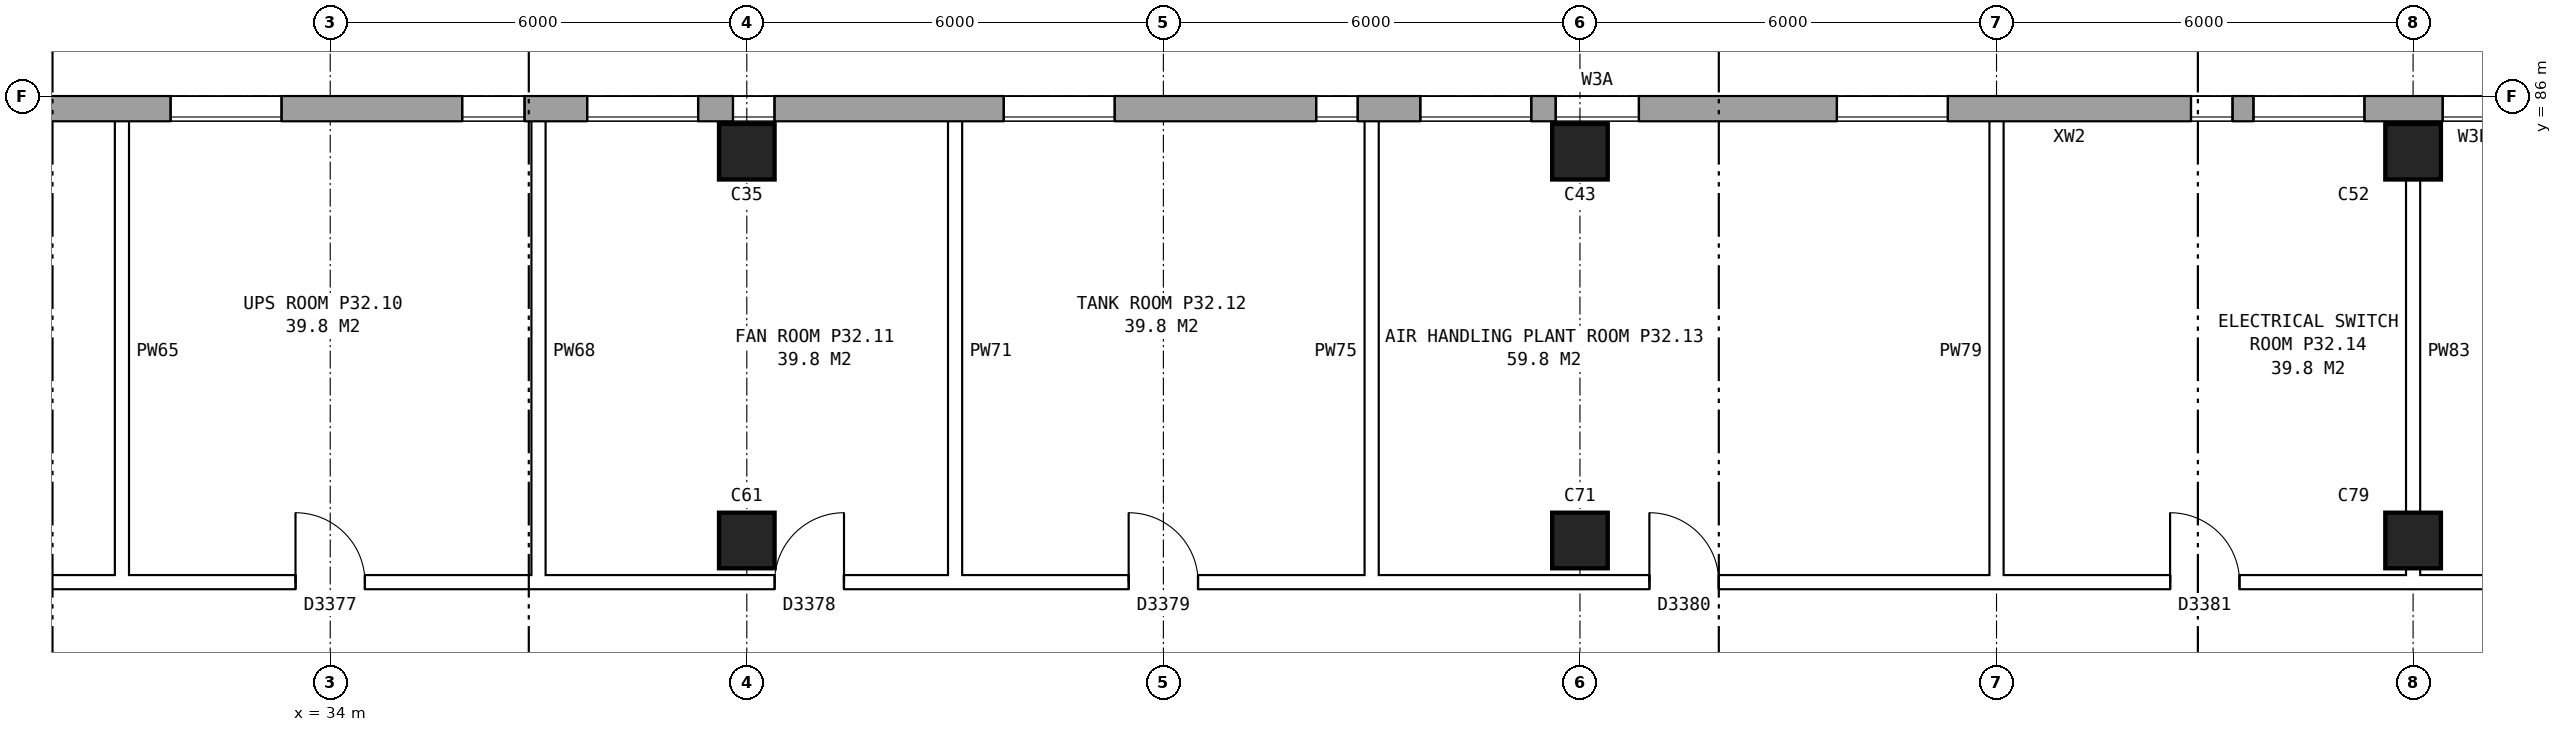
"""IFC4 building model, lengths in metres.
Left out: names, types, materials, properties, quantities, classifications, styles, units other than length and angle.
Written with IfcOpenShell. Run it as: python <this file> out.ifc"""

import sys

from ifc_helpers import new_model, si_unit, direction, frame, frame_2d, origin, origin_2d, place, context, subcontext, project, spatial, rectangle, extrude, element, fill, save


model = new_model("IFC4")
c1 = context("Model", 3, precision=1e-05, world=origin(), true_north=direction((0.0, 1.0)))
c2 = subcontext(c1, "Body", "Model", "MODEL_VIEW")
j1 = project(units=[si_unit("LENGTHUNIT", "METRE"), si_unit("PLANEANGLEUNIT", "RADIAN")], contexts=[c1])
p1 = place(None, origin())
s1 = spatial("IfcSite", under=j1, at=p1, CompositionType="ELEMENT")
p2 = place(p1, origin())
s2 = spatial("IfcBuilding", under=s1, at=p2, CompositionType="ELEMENT")
p3 = place(p2, frame((0.0, 0.0, 115.0)))
s3 = spatial("IfcBuildingStorey", under=s2, at=p3, CompositionType="ELEMENT", Elevation=115.0)
for number, where, z_axis, x_axis in (
    (1, (40.0, 79.6, 0.0), (0.0, 0.0, 1.0), (1.0, 0.0, 0.0)),
    (2, (40.0, 85.2, 0.0), (0.0, 0.0, 1.0), (1.0, 0.0, 0.0)),
    (3, (52.0, 79.6, 0.0), (0.0, 0.0, 1.0), (1.0, 0.0, 0.0)),
    (4, (52.0, 85.2, 0.0), (0.0, 0.0, 1.0), (1.0, 0.0, 0.0)),
    (5, (64.0, 79.6, 0.0), (0.0, 0.0, 1.0), (1.0, 0.0, 0.0)),
    (6, (64.0, 85.2, 0.0), (0.0, 0.0, 1.0), (1.0, 0.0, 0.0)),
):
    element("IfcColumn", number, at=place(p3, frame(where, z_axis=z_axis, x_axis=x_axis)), inside=s3, PredefinedType="COLUMN", context=c2, shape_type="SweptSolid", body=[
        extrude(rectangle(XDim=0.8, YDim=0.8, at=origin_2d()), origin(), (0.0, 0.0, 1.0), 4.2),
    ])
p4 = place(p3, frame((72.925, 85.82, 0.0), z_axis=(0.0, 0.0, 1.0), x_axis=(-1.0, 0.0, 0.0)))
e7 = element("IfcWall", 7, at=p4, inside=s3, PredefinedType="STANDARD", context=c2, shape_type="SweptSolid", body=[
    extrude(rectangle(XDim=43.101, YDim=0.36, at=frame_2d((21.55, 0.0))), origin(), (0.0, 0.0, 1.0), 4.2),
])
p5 = place(p4, frame((2.6, 0.0, 1.5)))
e8 = element("IfcOpeningElement", 8, at=p5, cuts=e7, PredefinedType="OPENING", context=c2, shape_type="SweptSolid", body=[
    extrude(rectangle(XDim=0.6, YDim=1.2, at=frame_2d((0.3, 0.6))), frame((0.0, 0.19, 0.0), z_axis=(0.0, -1.0, 0.0), x_axis=(1.0, 0.0, 0.0)), (0.0, 0.0, 1.0), 0.38),
])
p6 = place(p4, frame((3.625, 0.0, 1.5)))
e9 = element("IfcOpeningElement", 9, at=p6, cuts=e7, PredefinedType="OPENING", context=c2, shape_type="SweptSolid", body=[
    extrude(rectangle(XDim=1.6, YDim=1.2, at=frame_2d((0.8, 0.6))), frame((0.0, 0.19, 0.0), z_axis=(0.0, -1.0, 0.0), x_axis=(1.0, 0.0, 0.0)), (0.0, 0.0, 1.0), 0.38),
])
p7 = place(p4, frame((7.6, 0.0, 1.5)))
e10 = element("IfcOpeningElement", 10, at=p7, cuts=e7, PredefinedType="OPENING", context=c2, shape_type="SweptSolid", body=[
    extrude(rectangle(XDim=0.9, YDim=1.2, at=frame_2d((0.45, 0.6))), frame((0.0, 0.19, 0.0), z_axis=(0.0, -1.0, 0.0), x_axis=(1.0, 0.0, 0.0)), (0.0, 0.0, 1.0), 0.38),
])
p8 = place(p4, frame((9.625, 0.0, 1.5)))
e11 = element("IfcOpeningElement", 11, at=p8, cuts=e7, PredefinedType="OPENING", context=c2, shape_type="SweptSolid", body=[
    extrude(rectangle(XDim=1.6, YDim=1.2, at=frame_2d((0.8, 0.6))), frame((0.0, 0.19, 0.0), z_axis=(0.0, -1.0, 0.0), x_axis=(1.0, 0.0, 0.0)), (0.0, 0.0, 1.0), 0.38),
])
p9 = place(p4, frame((11.525, 0.0, 1.5)))
e12 = element("IfcOpeningElement", 12, at=p9, cuts=e7, PredefinedType="OPENING", context=c2, shape_type="SweptSolid", body=[
    extrude(rectangle(XDim=0.6, YDim=1.2, at=frame_2d((0.3, 0.6))), frame((0.0, 0.19, 0.0), z_axis=(0.0, -1.0, 0.0), x_axis=(1.0, 0.0, 0.0)), (0.0, 0.0, 1.0), 0.38),
])
p10 = place(p4, frame((15.625, 0.0, 1.5)))
e13 = element("IfcOpeningElement", 13, at=p10, cuts=e7, PredefinedType="OPENING", context=c2, shape_type="SweptSolid", body=[
    extrude(rectangle(XDim=1.6, YDim=1.2, at=frame_2d((0.8, 0.6))), frame((0.0, 0.19, 0.0), z_axis=(0.0, -1.0, 0.0), x_axis=(1.0, 0.0, 0.0)), (0.0, 0.0, 1.0), 0.38),
])
p11 = place(p4, frame((20.075, 0.0, 1.5)))
e14 = element("IfcOpeningElement", 14, at=p11, cuts=e7, PredefinedType="OPENING", context=c2, shape_type="SweptSolid", body=[
    extrude(rectangle(XDim=1.2, YDim=1.2, at=frame_2d((0.6, 0.6))), frame((0.0, 0.19, 0.0), z_axis=(0.0, -1.0, 0.0), x_axis=(1.0, 0.0, 0.0)), (0.0, 0.0, 1.0), 0.38),
])
p12 = place(p4, frame((21.625, 0.0, 1.5)))
e15 = element("IfcOpeningElement", 15, at=p12, cuts=e7, PredefinedType="OPENING", context=c2, shape_type="SweptSolid", body=[
    extrude(rectangle(XDim=1.6, YDim=1.2, at=frame_2d((0.8, 0.6))), frame((0.0, 0.19, 0.0), z_axis=(0.0, -1.0, 0.0), x_axis=(1.0, 0.0, 0.0)), (0.0, 0.0, 1.0), 0.38),
])
p13 = place(p4, frame((24.125, 0.0, 1.5)))
e16 = element("IfcOpeningElement", 16, at=p13, cuts=e7, PredefinedType="OPENING", context=c2, shape_type="SweptSolid", body=[
    extrude(rectangle(XDim=0.6, YDim=1.2, at=frame_2d((0.3, 0.6))), frame((0.0, 0.19, 0.0), z_axis=(0.0, -1.0, 0.0), x_axis=(1.0, 0.0, 0.0)), (0.0, 0.0, 1.0), 0.38),
])
p14 = place(p4, frame((27.625, 0.0, 1.5)))
e17 = element("IfcOpeningElement", 17, at=p14, cuts=e7, PredefinedType="OPENING", context=c2, shape_type="SweptSolid", body=[
    extrude(rectangle(XDim=1.6, YDim=1.2, at=frame_2d((0.8, 0.6))), frame((0.0, 0.19, 0.0), z_axis=(0.0, -1.0, 0.0), x_axis=(1.0, 0.0, 0.0)), (0.0, 0.0, 1.0), 0.38),
])
p15 = place(p4, frame((32.525, 0.0, 1.5)))
e18 = element("IfcOpeningElement", 18, at=p15, cuts=e7, PredefinedType="OPENING", context=c2, shape_type="SweptSolid", body=[
    extrude(rectangle(XDim=0.6, YDim=1.2, at=frame_2d((0.3, 0.6))), frame((0.0, 0.19, 0.0), z_axis=(0.0, -1.0, 0.0), x_axis=(1.0, 0.0, 0.0)), (0.0, 0.0, 1.0), 0.38),
])
p16 = place(p4, frame((33.625, 0.0, 1.5)))
e19 = element("IfcOpeningElement", 19, at=p16, cuts=e7, PredefinedType="OPENING", context=c2, shape_type="SweptSolid", body=[
    extrude(rectangle(XDim=1.6, YDim=1.2, at=frame_2d((0.8, 0.6))), frame((0.0, 0.19, 0.0), z_axis=(0.0, -1.0, 0.0), x_axis=(1.0, 0.0, 0.0)), (0.0, 0.0, 1.0), 0.38),
])
p17 = place(p4, frame((36.125, 0.0, 1.5)))
e20 = element("IfcOpeningElement", 20, at=p17, cuts=e7, PredefinedType="OPENING", context=c2, shape_type="SweptSolid", body=[
    extrude(rectangle(XDim=0.9, YDim=1.2, at=frame_2d((0.45, 0.6))), frame((0.0, 0.19, 0.0), z_axis=(0.0, -1.0, 0.0), x_axis=(1.0, 0.0, 0.0)), (0.0, 0.0, 1.0), 0.38),
])
p18 = place(p4, frame((39.625, 0.0, 1.5)))
e21 = element("IfcOpeningElement", 21, at=p18, cuts=e7, PredefinedType="OPENING", context=c2, shape_type="SweptSolid", body=[
    extrude(rectangle(XDim=1.6, YDim=1.2, at=frame_2d((0.8, 0.6))), frame((0.0, 0.19, 0.0), z_axis=(0.0, -1.0, 0.0), x_axis=(1.0, 0.0, 0.0)), (0.0, 0.0, 1.0), 0.38),
])
p19 = place(p3, frame((30.9, 79.0, 0.0), z_axis=(0.0, 0.0, 1.0), x_axis=(1.0, 0.0, 0.0)))
e22 = element("IfcWall", 22, at=p19, inside=s3, PredefinedType="PARTITIONING", context=c2, shape_type="SweptSolid", body=[
    extrude(rectangle(XDim=44.86, YDim=0.2, at=frame_2d((22.43, 0.0))), origin(), (0.0, 0.0, 1.0), 4.2),
])
p20 = place(p19, frame((2.6, 0.0, 0.0)))
e23 = element("IfcOpeningElement", 23, at=p20, cuts=e22, PredefinedType="OPENING", context=c2, shape_type="SweptSolid", body=[
    extrude(rectangle(XDim=1.0, YDim=2.1, at=frame_2d((0.5, 1.05))), frame((0.0, 0.11, 0.0), z_axis=(0.0, -1.0, 0.0), x_axis=(1.0, 0.0, 0.0)), (0.0, 0.0, 1.0), 0.22),
])
p21 = place(p19, frame((9.5, 0.0, 0.0)))
e24 = element("IfcOpeningElement", 24, at=p21, cuts=e22, PredefinedType="OPENING", context=c2, shape_type="SweptSolid", body=[
    extrude(rectangle(XDim=1.0, YDim=2.1, at=frame_2d((0.5, 1.05))), frame((0.0, 0.11, 0.0), z_axis=(0.0, -1.0, 0.0), x_axis=(1.0, 0.0, 0.0)), (0.0, 0.0, 1.0), 0.22),
])
p22 = place(p19, frame((14.6, 0.0, 0.0)))
e25 = element("IfcOpeningElement", 25, at=p22, cuts=e22, PredefinedType="OPENING", context=c2, shape_type="SweptSolid", body=[
    extrude(rectangle(XDim=1.0, YDim=2.1, at=frame_2d((0.5, 1.05))), frame((0.0, 0.11, 0.0), z_axis=(0.0, -1.0, 0.0), x_axis=(1.0, 0.0, 0.0)), (0.0, 0.0, 1.0), 0.22),
])
p23 = place(p19, frame((22.1, 0.0, 0.0)))
e26 = element("IfcOpeningElement", 26, at=p23, cuts=e22, PredefinedType="OPENING", context=c2, shape_type="SweptSolid", body=[
    extrude(rectangle(XDim=1.0, YDim=2.1, at=frame_2d((0.5, 1.05))), frame((0.0, 0.11, 0.0), z_axis=(0.0, -1.0, 0.0), x_axis=(1.0, 0.0, 0.0)), (0.0, 0.0, 1.0), 0.22),
])
p24 = place(p19, frame((29.6, 0.0, 0.0)))
e27 = element("IfcOpeningElement", 27, at=p24, cuts=e22, PredefinedType="OPENING", context=c2, shape_type="SweptSolid", body=[
    extrude(rectangle(XDim=1.0, YDim=2.1, at=frame_2d((0.5, 1.05))), frame((0.0, 0.11, 0.0), z_axis=(0.0, -1.0, 0.0), x_axis=(1.0, 0.0, 0.0)), (0.0, 0.0, 1.0), 0.22),
])
p25 = place(p19, frame((38.42, 0.0, 0.0)))
e28 = element("IfcOpeningElement", 28, at=p25, cuts=e22, PredefinedType="OPENING", context=c2, shape_type="SweptSolid", body=[
    extrude(rectangle(XDim=1.0, YDim=2.1, at=frame_2d((0.5, 1.05))), frame((0.0, 0.11, 0.0), z_axis=(0.0, -1.0, 0.0), x_axis=(1.0, 0.0, 0.0)), (0.0, 0.0, 1.0), 0.22),
])
p26 = place(p3, frame((26.99, 79.0, 0.0), z_axis=(0.0, 0.0, 1.0), x_axis=(1.0, 0.0, 0.0)))
e29 = element("IfcWall", 29, at=p26, inside=s3, PredefinedType="PARTITIONING", context=c2, shape_type="SweptSolid", body=[
    extrude(rectangle(XDim=4.11, YDim=0.2, at=frame_2d((2.055, 0.0))), origin(), (0.0, 0.0, 1.0), 4.2),
])
p27 = place(p26, frame((0.665, 0.0, 0.0)))
e30 = element("IfcOpeningElement", 30, at=p27, cuts=e29, PredefinedType="OPENING", context=c2, shape_type="SweptSolid", body=[
    extrude(rectangle(XDim=1.0, YDim=2.1, at=frame_2d((0.5, 1.05))), frame((0.0, 0.11, 0.0), z_axis=(0.0, -1.0, 0.0), x_axis=(1.0, 0.0, 0.0)), (0.0, 0.0, 1.0), 0.22),
])
for number, where, z_axis, x_axis in (
    (31, (31.0, 78.9, 0.0), (0.0, 0.0, 1.0), (0.0, 1.0, 0.0)),
    (32, (37.0, 78.9, 0.0), (0.0, 0.0, 1.0), (0.0, 1.0, 0.0)),
    (33, (43.0, 78.9, 0.0), (0.0, 0.0, 1.0), (0.0, 1.0, 0.0)),
    (34, (49.0, 78.9, 0.0), (0.0, 0.0, 1.0), (0.0, 1.0, 0.0)),
    (35, (58.0, 78.9, 0.0), (0.0, 0.0, 1.0), (0.0, 1.0, 0.0)),
    (36, (64.0, 78.9, 0.0), (0.0, 0.0, 1.0), (0.0, 1.0, 0.0)),
):
    element("IfcWall", number, at=place(p3, frame(where, z_axis=z_axis, x_axis=x_axis)), inside=s3, PredefinedType="PARTITIONING", context=c2, shape_type="SweptSolid", body=[
        extrude(rectangle(XDim=6.86, YDim=0.2, at=frame_2d((3.43, 0.0))), origin(), (0.0, 0.0, 1.0), 4.2),
    ])
p28 = place(p7, origin())
e37 = element("IfcWindow", 37, at=p28, inside=s3, PartitioningType="DOUBLE_PANEL_HORIZONTAL", PredefinedType="WINDOW", context=c2, shape_type="SweptSolid", body=[
    extrude(rectangle(XDim=0.9, YDim=1.2, at=frame_2d((0.45, 0.6))), frame((0.0, 0.15, 0.0), z_axis=(0.0, -1.0, 0.0), x_axis=(1.0, 0.0, 0.0)), (0.0, 0.0, 1.0), 0.06),
])
fill(e10, e37)
p29 = place(p8, origin())
e38 = element("IfcWindow", 38, at=p29, inside=s3, PartitioningType="DOUBLE_PANEL_HORIZONTAL", PredefinedType="WINDOW", context=c2, shape_type="SweptSolid", body=[
    extrude(rectangle(XDim=1.6, YDim=1.2, at=frame_2d((0.8, 0.6))), frame((0.0, 0.15, 0.0), z_axis=(0.0, -1.0, 0.0), x_axis=(1.0, 0.0, 0.0)), (0.0, 0.0, 1.0), 0.06),
])
fill(e11, e38)
p30 = place(p9, origin())
e39 = element("IfcWindow", 39, at=p30, inside=s3, PartitioningType="DOUBLE_PANEL_HORIZONTAL", PredefinedType="WINDOW", context=c2, shape_type="SweptSolid", body=[
    extrude(rectangle(XDim=0.6, YDim=1.2, at=frame_2d((0.3, 0.6))), frame((0.0, 0.15, 0.0), z_axis=(0.0, -1.0, 0.0), x_axis=(1.0, 0.0, 0.0)), (0.0, 0.0, 1.0), 0.06),
])
fill(e12, e39)
p31 = place(p10, origin())
e40 = element("IfcWindow", 40, at=p31, inside=s3, PartitioningType="DOUBLE_PANEL_HORIZONTAL", PredefinedType="WINDOW", context=c2, shape_type="SweptSolid", body=[
    extrude(rectangle(XDim=1.6, YDim=1.2, at=frame_2d((0.8, 0.6))), frame((0.0, 0.15, 0.0), z_axis=(0.0, -1.0, 0.0), x_axis=(1.0, 0.0, 0.0)), (0.0, 0.0, 1.0), 0.06),
])
fill(e13, e40)
p32 = place(p11, origin())
e41 = element("IfcWindow", 41, at=p32, inside=s3, PartitioningType="DOUBLE_PANEL_HORIZONTAL", PredefinedType="WINDOW", context=c2, shape_type="SweptSolid", body=[
    extrude(rectangle(XDim=1.2, YDim=1.2, at=frame_2d((0.6, 0.6))), frame((0.0, 0.15, 0.0), z_axis=(0.0, -1.0, 0.0), x_axis=(1.0, 0.0, 0.0)), (0.0, 0.0, 1.0), 0.06),
])
fill(e14, e41)
p33 = place(p12, origin())
e42 = element("IfcWindow", 42, at=p33, inside=s3, PartitioningType="DOUBLE_PANEL_HORIZONTAL", PredefinedType="WINDOW", context=c2, shape_type="SweptSolid", body=[
    extrude(rectangle(XDim=1.6, YDim=1.2, at=frame_2d((0.8, 0.6))), frame((0.0, 0.15, 0.0), z_axis=(0.0, -1.0, 0.0), x_axis=(1.0, 0.0, 0.0)), (0.0, 0.0, 1.0), 0.06),
])
fill(e15, e42)
p34 = place(p13, origin())
e43 = element("IfcWindow", 43, at=p34, inside=s3, PartitioningType="DOUBLE_PANEL_HORIZONTAL", PredefinedType="WINDOW", context=c2, shape_type="SweptSolid", body=[
    extrude(rectangle(XDim=0.6, YDim=1.2, at=frame_2d((0.3, 0.6))), frame((0.0, 0.15, 0.0), z_axis=(0.0, -1.0, 0.0), x_axis=(1.0, 0.0, 0.0)), (0.0, 0.0, 1.0), 0.06),
])
fill(e16, e43)
p35 = place(p14, origin())
e44 = element("IfcWindow", 44, at=p35, inside=s3, PartitioningType="DOUBLE_PANEL_HORIZONTAL", PredefinedType="WINDOW", context=c2, shape_type="SweptSolid", body=[
    extrude(rectangle(XDim=1.6, YDim=1.2, at=frame_2d((0.8, 0.6))), frame((0.0, 0.15, 0.0), z_axis=(0.0, -1.0, 0.0), x_axis=(1.0, 0.0, 0.0)), (0.0, 0.0, 1.0), 0.06),
])
fill(e17, e44)
p36 = place(p15, origin())
e45 = element("IfcWindow", 45, at=p36, inside=s3, PartitioningType="DOUBLE_PANEL_HORIZONTAL", PredefinedType="WINDOW", context=c2, shape_type="SweptSolid", body=[
    extrude(rectangle(XDim=0.6, YDim=1.2, at=frame_2d((0.3, 0.6))), frame((0.0, 0.15, 0.0), z_axis=(0.0, -1.0, 0.0), x_axis=(1.0, 0.0, 0.0)), (0.0, 0.0, 1.0), 0.06),
])
fill(e18, e45)
p37 = place(p16, origin())
e46 = element("IfcWindow", 46, at=p37, inside=s3, PartitioningType="DOUBLE_PANEL_HORIZONTAL", PredefinedType="WINDOW", context=c2, shape_type="SweptSolid", body=[
    extrude(rectangle(XDim=1.6, YDim=1.2, at=frame_2d((0.8, 0.6))), frame((0.0, 0.15, 0.0), z_axis=(0.0, -1.0, 0.0), x_axis=(1.0, 0.0, 0.0)), (0.0, 0.0, 1.0), 0.06),
])
fill(e19, e46)
p38 = place(p17, origin())
e47 = element("IfcWindow", 47, at=p38, inside=s3, PartitioningType="DOUBLE_PANEL_HORIZONTAL", PredefinedType="WINDOW", context=c2, shape_type="SweptSolid", body=[
    extrude(rectangle(XDim=0.9, YDim=1.2, at=frame_2d((0.45, 0.6))), frame((0.0, 0.15, 0.0), z_axis=(0.0, -1.0, 0.0), x_axis=(1.0, 0.0, 0.0)), (0.0, 0.0, 1.0), 0.06),
])
fill(e20, e47)
p39 = place(p18, origin())
e48 = element("IfcWindow", 48, at=p39, inside=s3, PartitioningType="DOUBLE_PANEL_HORIZONTAL", PredefinedType="WINDOW", context=c2, shape_type="SweptSolid", body=[
    extrude(rectangle(XDim=1.6, YDim=1.2, at=frame_2d((0.8, 0.6))), frame((0.0, 0.15, 0.0), z_axis=(0.0, -1.0, 0.0), x_axis=(1.0, 0.0, 0.0)), (0.0, 0.0, 1.0), 0.06),
])
fill(e21, e48)
p40 = place(p20, origin())
e49 = element("IfcDoor", 49, at=p40, inside=s3, OperationType="SINGLE_SWING_LEFT", PredefinedType="DOOR", context=c2, shape_type="SweptSolid", body=[
    extrude(rectangle(XDim=1.0, YDim=2.1, at=frame_2d((0.5, 1.05))), frame((0.0, 0.025, 0.0), z_axis=(0.0, -1.0, 0.0), x_axis=(1.0, 0.0, 0.0)), (0.0, 0.0, 1.0), 0.05),
])
fill(e23, e49)
p41 = place(p21, origin())
e50 = element("IfcDoor", 50, at=p41, inside=s3, OperationType="SINGLE_SWING_RIGHT", PredefinedType="DOOR", context=c2, shape_type="SweptSolid", body=[
    extrude(rectangle(XDim=1.0, YDim=2.1, at=frame_2d((0.5, 1.05))), frame((0.0, 0.025, 0.0), z_axis=(0.0, -1.0, 0.0), x_axis=(1.0, 0.0, 0.0)), (0.0, 0.0, 1.0), 0.05),
])
fill(e24, e50)
p42 = place(p22, origin())
e51 = element("IfcDoor", 51, at=p42, inside=s3, OperationType="SINGLE_SWING_LEFT", PredefinedType="DOOR", context=c2, shape_type="SweptSolid", body=[
    extrude(rectangle(XDim=1.0, YDim=2.1, at=frame_2d((0.5, 1.05))), frame((0.0, 0.025, 0.0), z_axis=(0.0, -1.0, 0.0), x_axis=(1.0, 0.0, 0.0)), (0.0, 0.0, 1.0), 0.05),
])
fill(e25, e51)
p43 = place(p23, origin())
e52 = element("IfcDoor", 52, at=p43, inside=s3, OperationType="SINGLE_SWING_LEFT", PredefinedType="DOOR", context=c2, shape_type="SweptSolid", body=[
    extrude(rectangle(XDim=1.0, YDim=2.1, at=frame_2d((0.5, 1.05))), frame((0.0, 0.025, 0.0), z_axis=(0.0, -1.0, 0.0), x_axis=(1.0, 0.0, 0.0)), (0.0, 0.0, 1.0), 0.05),
])
fill(e26, e52)
p44 = place(p24, origin())
e53 = element("IfcDoor", 53, at=p44, inside=s3, OperationType="SINGLE_SWING_LEFT", PredefinedType="DOOR", context=c2, shape_type="SweptSolid", body=[
    extrude(rectangle(XDim=1.0, YDim=2.1, at=frame_2d((0.5, 1.05))), frame((0.0, 0.025, 0.0), z_axis=(0.0, -1.0, 0.0), x_axis=(1.0, 0.0, 0.0)), (0.0, 0.0, 1.0), 0.05),
])
fill(e27, e53)
save(model, sys.argv[1])
